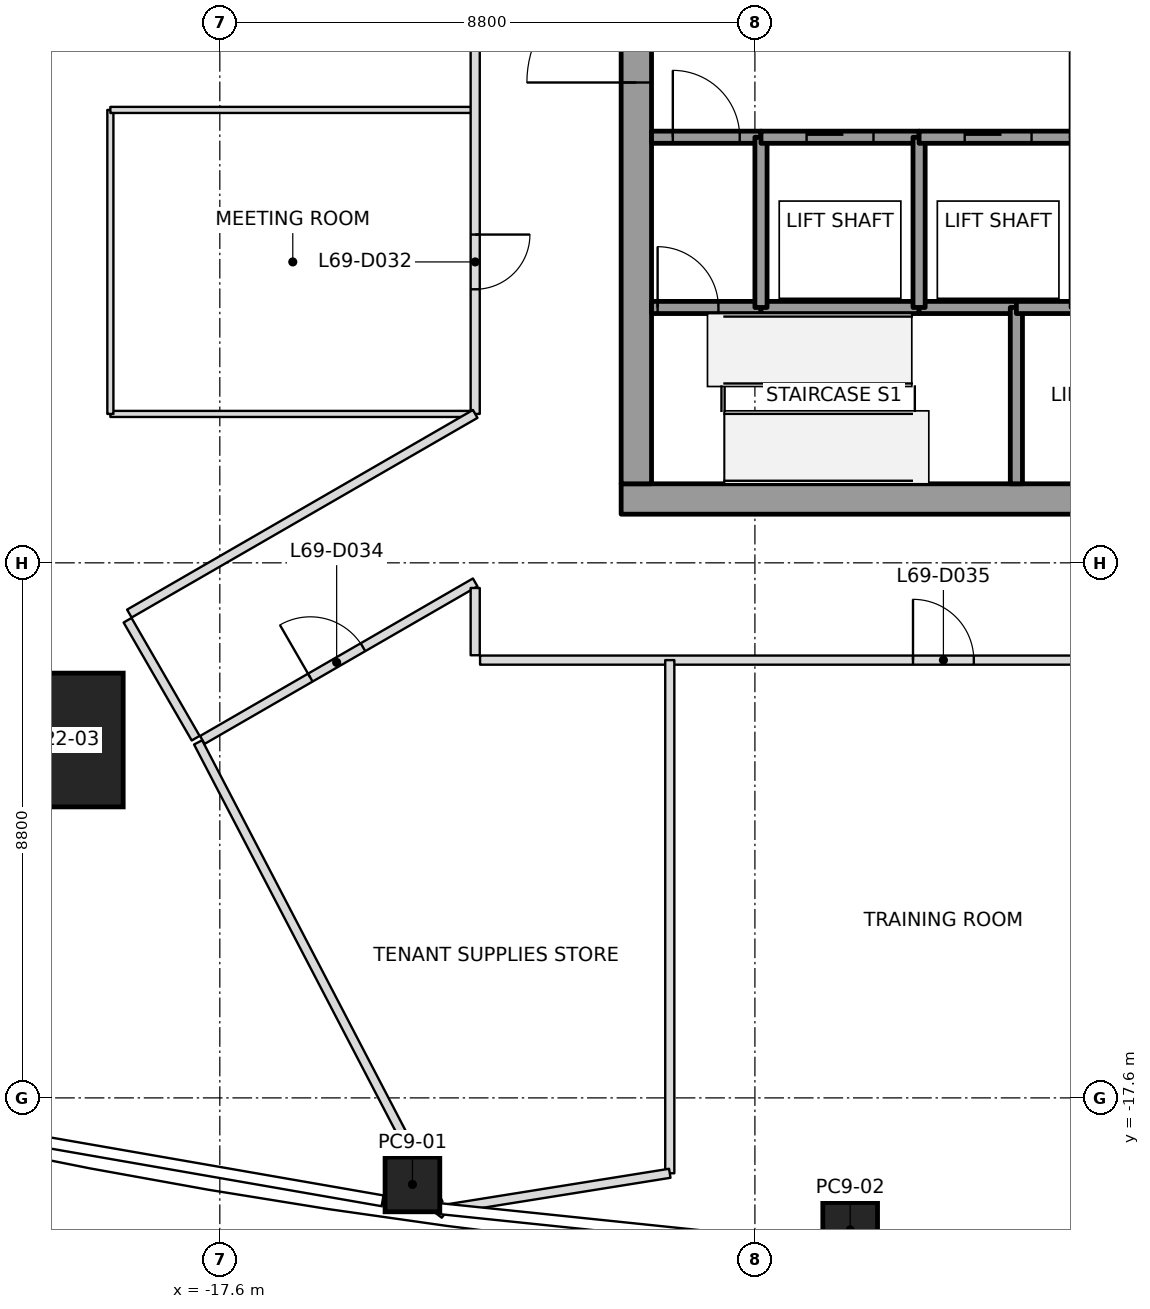
"""IFC4 building model, lengths in metres.
Left out: names, types, materials, properties, quantities, classifications, styles, units other than length and angle.
Written with IfcOpenShell. Run it as: python <this file> out.ifc"""

import sys

from ifc_helpers import new_model, si_unit, direction, frame, frame_2d, origin, origin_2d, place, context, subcontext, project, spatial, rectangle, extrude, element, fill, save


model = new_model("IFC4")
c1 = context("Model", 3, precision=1e-05, world=origin(), true_north=direction((0.0, 1.0)))
c2 = subcontext(c1, "Body", "Model", "MODEL_VIEW")
j1 = project(units=[si_unit("LENGTHUNIT", "METRE"), si_unit("PLANEANGLEUNIT", "RADIAN")], contexts=[c1])
p1 = place(None, origin())
s1 = spatial("IfcSite", under=j1, at=p1, CompositionType="ELEMENT")
p2 = place(p1, origin())
s2 = spatial("IfcBuilding", under=s1, at=p2, CompositionType="ELEMENT")
p3 = place(p2, frame((0.0, 0.0, 303.0)))
s3 = spatial("IfcBuildingStorey", under=s2, at=p3, CompositionType="ELEMENT", Elevation=303.0)
p4 = place(p3, frame((-20.289, -11.714, 0.0), z_axis=(0.027756720281, 0.01604399436, 0.999485945236), x_axis=(0.999614708015, -0.000445500311, -0.027753144871)))
e1 = element("IfcColumn", 1, at=p4, inside=s3, PredefinedType="COLUMN", context=c2, shape_type="SweptSolid", body=[
    extrude(rectangle(XDim=2.2, YDim=2.2, at=origin_2d()), origin(), (0.0, 0.0, 1.0), 4.002),
])
p5 = place(p3, frame((-14.432, -19.023, 0.0), z_axis=(0.017391452496, 0.010373848857, 0.999794939295), x_axis=(-0.990356057781, 0.137641808402, 0.01579909479)))
e2 = element("IfcColumn", 2, at=p5, inside=s3, PredefinedType="COLUMN", context=c2, shape_type="SweptSolid", body=[
    extrude(rectangle(XDim=0.9, YDim=0.9, at=origin_2d()), origin(), (0.0, 0.0, 1.0), 4.001),
])
p6 = place(p3, frame((-7.233, -19.771, 0.0), z_axis=(0.008727150594, 0.011168311599, 0.999899547784), x_axis=(-0.997585590685, 0.06899278007, 0.007936344038)))
e3 = element("IfcColumn", 3, at=p6, inside=s3, PredefinedType="COLUMN", context=c2, shape_type="SweptSolid", body=[
    extrude(rectangle(XDim=0.9, YDim=0.9, at=origin_2d()), origin(), (0.0, 0.0, 1.0), 4.0),
])
p7 = place(p3, frame((-11.0, -7.75, 0.0), z_axis=(0.0, 0.0, 1.0), x_axis=(1.0, 0.0, 0.0)))
e4 = element("IfcWall", 4, at=p7, inside=s3, PredefinedType="SHEAR", context=c2, shape_type="SweptSolid", body=[
    extrude(rectangle(XDim=22.0, YDim=0.5, at=frame_2d((11.0, 0.0))), origin(), (0.0, 0.0, 1.0), 4.0),
])
p8 = place(p7, frame((10.45, 0.0, 0.0)))
e5 = element("IfcOpeningElement", 5, at=p8, cuts=e4, PredefinedType="OPENING", context=c2, shape_type="SweptSolid", body=[
    extrude(rectangle(XDim=1.1, YDim=2.1, at=frame_2d((0.55, 1.05))), frame((0.0, 0.25, 0.0), z_axis=(0.0, -1.0, 0.0), x_axis=(1.0, 0.0, 0.0)), (0.0, 0.0, 1.0), 0.5),
])
p9 = place(p3, frame((-10.75, -7.5, 0.0), z_axis=(0.0, 0.0, 1.0), x_axis=(0.0, 1.0, 0.0)))
e6 = element("IfcWall", 6, at=p9, inside=s3, PredefinedType="SHEAR", context=c2, shape_type="SweptSolid", body=[
    extrude(rectangle(XDim=15.0, YDim=0.5, at=frame_2d((7.5, 0.0))), origin(), (0.0, 0.0, 1.0), 4.0),
])
p10 = place(p9, frame((6.6, 0.0, 0.0)))
e7 = element("IfcOpeningElement", 7, at=p10, cuts=e6, PredefinedType="OPENING", context=c2, shape_type="SweptSolid", body=[
    extrude(rectangle(XDim=1.8, YDim=2.1, at=frame_2d((0.9, 1.05))), frame((0.0, 0.25, 0.0), z_axis=(0.0, -1.0, 0.0), x_axis=(1.0, 0.0, 0.0)), (0.0, 0.0, 1.0), 0.5),
])
p11 = place(p3, frame((-10.5, -4.6, 0.0), z_axis=(0.0, 0.0, 1.0), x_axis=(1.0, 0.0, 0.0)))
e8 = element("IfcWall", 8, at=p11, inside=s3, PredefinedType="SOLIDWALL", context=c2, shape_type="SweptSolid", body=[
    extrude(rectangle(XDim=1.8, YDim=0.2, at=frame_2d((0.9, 0.0))), origin(), (0.0, 0.0, 1.0), 3.85),
])
p12 = place(p11, frame((0.1, 0.0, 0.0)))
e9 = element("IfcOpeningElement", 9, at=p12, cuts=e8, PredefinedType="OPENING", context=c2, shape_type="SweptSolid", body=[
    extrude(rectangle(XDim=1.0, YDim=2.1, at=frame_2d((0.5, 1.05))), frame((0.0, 0.1, 0.0), z_axis=(0.0, -1.0, 0.0), x_axis=(1.0, 0.0, 0.0)), (0.0, 0.0, 1.0), 0.2),
])
p13 = place(p3, frame((-10.5, -1.8, 0.0), z_axis=(0.0, 0.0, 1.0), x_axis=(1.0, 0.0, 0.0)))
e10 = element("IfcWall", 10, at=p13, inside=s3, PredefinedType="SOLIDWALL", context=c2, shape_type="SweptSolid", body=[
    extrude(rectangle(XDim=1.8, YDim=0.2, at=frame_2d((0.9, 0.0))), origin(), (0.0, 0.0, 1.0), 3.85),
])
p14 = place(p13, frame((0.35, 0.0, 0.0)))
e11 = element("IfcOpeningElement", 11, at=p14, cuts=e10, PredefinedType="OPENING", context=c2, shape_type="SweptSolid", body=[
    extrude(rectangle(XDim=1.1, YDim=2.1, at=frame_2d((0.55, 1.05))), frame((0.0, 0.1, 0.0), z_axis=(0.0, -1.0, 0.0), x_axis=(1.0, 0.0, 0.0)), (0.0, 0.0, 1.0), 0.2),
])
p15 = place(p3, frame((-8.7, -4.6, 0.0), z_axis=(0.0, 0.0, 1.0), x_axis=(1.0, 0.0, 0.0)))
e12 = element("IfcWall", 12, at=p15, inside=s3, PredefinedType="SOLIDWALL", context=c2, shape_type="SweptSolid", body=[
    extrude(rectangle(XDim=2.6, YDim=0.2, at=frame_2d((1.3, 0.0))), origin(), (0.0, 0.0, 1.0), 3.85),
])
p16 = place(p3, frame((-8.7, -4.6, 0.0), z_axis=(0.0, 0.0, 1.0), x_axis=(0.0, 1.0, 0.0)))
e13 = element("IfcWall", 13, at=p16, inside=s3, PredefinedType="SOLIDWALL", context=c2, shape_type="SweptSolid", body=[
    extrude(rectangle(XDim=2.8, YDim=0.2, at=frame_2d((1.4, 0.0))), origin(), (0.0, 0.0, 1.0), 3.85),
])
p17 = place(p3, frame((-8.7, -1.8, 0.0), z_axis=(0.0, 0.0, 1.0), x_axis=(1.0, 0.0, 0.0)))
e14 = element("IfcWall", 14, at=p17, inside=s3, PredefinedType="SOLIDWALL", context=c2, shape_type="SweptSolid", body=[
    extrude(rectangle(XDim=2.6, YDim=0.2, at=frame_2d((1.3, 0.0))), origin(), (0.0, 0.0, 1.0), 3.85),
])
p18 = place(p17, frame((0.75, 0.0, 0.0)))
e15 = element("IfcOpeningElement", 15, at=p18, cuts=e14, PredefinedType="OPENING", context=c2, shape_type="SweptSolid", body=[
    extrude(rectangle(XDim=1.1, YDim=2.1, at=frame_2d((0.55, 1.05))), frame((0.0, 0.1, 0.0), z_axis=(0.0, -1.0, 0.0), x_axis=(1.0, 0.0, 0.0)), (0.0, 0.0, 1.0), 0.2),
])
p19 = place(p3, frame((-6.1, -4.6, 0.0), z_axis=(0.0, 0.0, 1.0), x_axis=(1.0, 0.0, 0.0)))
e16 = element("IfcWall", 16, at=p19, inside=s3, PredefinedType="SOLIDWALL", context=c2, shape_type="SweptSolid", body=[
    extrude(rectangle(XDim=1.6, YDim=0.2, at=frame_2d((0.8, 0.0))), origin(), (0.0, 0.0, 1.0), 3.85),
])
p20 = place(p3, frame((-6.1, -4.6, 0.0), z_axis=(0.0, 0.0, 1.0), x_axis=(0.0, 1.0, 0.0)))
e17 = element("IfcWall", 17, at=p20, inside=s3, PredefinedType="SOLIDWALL", context=c2, shape_type="SweptSolid", body=[
    extrude(rectangle(XDim=2.8, YDim=0.2, at=frame_2d((1.4, 0.0))), origin(), (0.0, 0.0, 1.0), 3.85),
])
p21 = place(p3, frame((-6.1, -1.8, 0.0), z_axis=(0.0, 0.0, 1.0), x_axis=(1.0, 0.0, 0.0)))
e18 = element("IfcWall", 18, at=p21, inside=s3, PredefinedType="SOLIDWALL", context=c2, shape_type="SweptSolid", body=[
    extrude(rectangle(XDim=2.6, YDim=0.2, at=frame_2d((1.3, 0.0))), origin(), (0.0, 0.0, 1.0), 3.85),
])
p22 = place(p21, frame((0.75, 0.0, 0.0)))
e19 = element("IfcOpeningElement", 19, at=p22, cuts=e18, PredefinedType="OPENING", context=c2, shape_type="SweptSolid", body=[
    extrude(rectangle(XDim=1.1, YDim=2.1, at=frame_2d((0.55, 1.05))), frame((0.0, 0.1, 0.0), z_axis=(0.0, -1.0, 0.0), x_axis=(1.0, 0.0, 0.0)), (0.0, 0.0, 1.0), 0.2),
])
p23 = place(p3, frame((-4.5, -4.6, 0.0), z_axis=(0.0, 0.0, 1.0), x_axis=(0.0, -1.0, 0.0)))
e20 = element("IfcWall", 20, at=p23, inside=s3, PredefinedType="SOLIDWALL", context=c2, shape_type="SweptSolid", body=[
    extrude(rectangle(XDim=2.9, YDim=0.2, at=frame_2d((1.45, 0.0))), origin(), (0.0, 0.0, 1.0), 3.85),
])
p24 = place(p3, frame((-4.5, -4.6, 0.0), z_axis=(0.0, 0.0, 1.0), x_axis=(1.0, 0.0, 0.0)))
e21 = element("IfcWall", 21, at=p24, inside=s3, PredefinedType="SOLIDWALL", context=c2, shape_type="SweptSolid", body=[
    extrude(rectangle(XDim=1.0, YDim=0.2, at=frame_2d((0.5, 0.0))), origin(), (0.0, 0.0, 1.0), 3.85),
])
p25 = place(p3, frame((-17.957, -11.753, 0.0), z_axis=(0.0, 0.0, 1.0), x_axis=(0.462142572693, -0.886805639644, 0.0)))
e22 = element("IfcWall", 22, at=p25, inside=s3, PredefinedType="PARTITIONING", context=c2, shape_type="SweptSolid", body=[
    extrude(rectangle(XDim=8.553, YDim=0.15, at=frame_2d((4.276, 0.0))), origin(), (0.0, 0.0, 1.0), 3.3),
])
p26 = place(p3, frame((-10.2, -10.4, 0.0), z_axis=(0.0, 0.0, 1.0), x_axis=(0.0, -1.0, 0.0)))
e23 = element("IfcWall", 23, at=p26, inside=s3, PredefinedType="PARTITIONING", context=c2, shape_type="SweptSolid", body=[
    extrude(rectangle(XDim=8.44, YDim=0.15, at=frame_2d((4.22, 0.0))), origin(), (0.0, 0.0, 1.0), 3.3),
])
p27 = place(p3, frame((-10.2, -18.84, 0.0), z_axis=(0.0, 0.0, 1.0), x_axis=(-0.987451332471, -0.157923608119, 0.0)))
e24 = element("IfcWall", 24, at=p27, inside=s3, PredefinedType="PARTITIONING", context=c2, shape_type="SweptSolid", body=[
    extrude(rectangle(XDim=3.701, YDim=0.15, at=frame_2d((1.851, 0.0))), origin(), (0.0, 0.0, 1.0), 3.234),
])
p28 = place(p3, frame((-13.905, -19.511, 0.0), z_axis=(0.0, 0.0, 1.0), x_axis=(-0.796009034685, 0.605284740185, 0.0)))
e25 = element("IfcWall", 25, at=p28, inside=s3, PredefinedType="PARTITIONING", context=c2, shape_type="SweptSolid", body=[
    extrude(rectangle(XDim=0.184, YDim=0.15, at=frame_2d((0.092, 0.0))), origin(), (0.0, 0.0, 1.0), 3.3),
])
p29 = place(p3, frame((-19.117, -9.744, 0.0), z_axis=(0.0, 0.0, 1.0), x_axis=(0.500030632641, -0.866007717299, 0.0)))
e26 = element("IfcWall", 26, at=p29, inside=s3, PredefinedType="PARTITIONING", context=c2, shape_type="SweptSolid", body=[
    extrude(rectangle(XDim=2.24, YDim=0.15, at=frame_2d((1.12, 0.0))), origin(), (0.0, 0.0, 1.0), 3.233),
])
p30 = place(p3, frame((-13.4, 6.351, 0.0), z_axis=(0.0, 0.0, 1.0), x_axis=(0.0, -1.0, 0.0)))
e27 = element("IfcWall", 27, at=p30, inside=s3, PredefinedType="PARTITIONING", context=c2, shape_type="SweptSolid", body=[
    extrude(rectangle(XDim=12.702, YDim=0.15, at=frame_2d((6.351, 0.0))), origin(), (0.0, 0.0, 1.0), 3.3),
])
p31 = place(p30, frame((9.752, 0.0, 0.0)))
e28 = element("IfcOpeningElement", 28, at=p31, cuts=e27, PredefinedType="OPENING", context=c2, shape_type="SweptSolid", body=[
    extrude(rectangle(XDim=0.9, YDim=2.1, at=frame_2d((0.45, 1.05))), frame((0.0, 0.075, 0.0), z_axis=(0.0, -1.0, 0.0), x_axis=(1.0, 0.0, 0.0)), (0.0, 0.0, 1.0), 0.15),
])
p32 = place(p30, frame((3.301, 0.0, 0.0)))
e29 = element("IfcOpeningElement", 29, at=p32, cuts=e27, PredefinedType="OPENING", context=c2, shape_type="SweptSolid", body=[
    extrude(rectangle(XDim=1.0, YDim=2.1, at=frame_2d((0.5, 1.05))), frame((0.0, 0.075, 0.0), z_axis=(0.0, -1.0, 0.0), x_axis=(1.0, 0.0, 0.0)), (0.0, 0.0, 1.0), 0.15),
])
p33 = place(p3, frame((-13.4, -6.351, 0.0), z_axis=(0.0, 0.0, 1.0), x_axis=(-0.866027119138, -0.499997028909, 0.0)))
e30 = element("IfcWall", 30, at=p33, inside=s3, PredefinedType="PARTITIONING", context=c2, shape_type="SweptSolid", body=[
    extrude(rectangle(XDim=6.568, YDim=0.15, at=frame_2d((3.284, 0.0))), origin(), (0.0, 0.0, 1.0), 3.3),
])
p34 = place(p3, frame((-17.888, -11.713, 0.0), z_axis=(0.0, 0.0, 1.0), x_axis=(0.866022397746, 0.500005206576, 0.0)))
e31 = element("IfcWall", 31, at=p34, inside=s3, PredefinedType="PARTITIONING", context=c2, shape_type="SweptSolid", body=[
    extrude(rectangle(XDim=5.182, YDim=0.15, at=frame_2d((2.591, 0.0))), origin(), (0.0, 0.0, 1.0), 3.233),
])
p35 = place(p34, frame((2.051, 0.0, 0.0)))
e32 = element("IfcOpeningElement", 32, at=p35, cuts=e31, PredefinedType="OPENING", context=c2, shape_type="SweptSolid", body=[
    extrude(rectangle(XDim=1.0, YDim=2.1, at=frame_2d((0.5, 1.05))), frame((0.0, 0.075, 0.0), z_axis=(0.0, -1.0, 0.0), x_axis=(1.0, 0.0, 0.0)), (0.0, 0.0, 1.0), 0.15),
])
p36 = place(p3, frame((-13.4, -9.214, 0.0), z_axis=(0.0, 0.0, 1.0), x_axis=(0.0, -1.0, 0.0)))
e33 = element("IfcWall", 33, at=p36, inside=s3, PredefinedType="PARTITIONING", context=c2, shape_type="SweptSolid", body=[
    extrude(rectangle(XDim=1.106, YDim=0.15, at=frame_2d((0.553, 0.0))), origin(), (0.0, 0.0, 1.0), 3.233),
])
p37 = place(p3, frame((-13.32, -10.4, 0.0), z_axis=(0.0, 0.0, 1.0), x_axis=(1.0, 0.0, 0.0)))
e34 = element("IfcWall", 34, at=p37, inside=s3, PredefinedType="PARTITIONING", context=c2, shape_type="SweptSolid", body=[
    extrude(rectangle(XDim=12.12, YDim=0.15, at=frame_2d((6.06, 0.0))), origin(), (0.0, 0.0, 1.0), 3.3),
])
p38 = place(p37, frame((7.12, 0.0, 0.0)))
e35 = element("IfcOpeningElement", 35, at=p38, cuts=e34, PredefinedType="OPENING", context=c2, shape_type="SweptSolid", body=[
    extrude(rectangle(XDim=1.0, YDim=2.1, at=frame_2d((0.5, 1.05))), frame((0.0, 0.075, 0.0), z_axis=(0.0, -1.0, 0.0), x_axis=(1.0, 0.0, 0.0)), (0.0, 0.0, 1.0), 0.15),
])
p39 = place(p3, frame((-13.46, -6.351, 0.0), z_axis=(0.0, 0.0, 1.0), x_axis=(-1.0, 0.0, 0.0)))
e36 = element("IfcWall", 36, at=p39, inside=s3, PredefinedType="PARTITIONING", context=c2, shape_type="SweptSolid", body=[
    extrude(rectangle(XDim=5.94, YDim=0.1, at=frame_2d((2.97, 0.0))), origin(), (0.0, 0.0, 1.0), 3.3),
])
p40 = place(p3, frame((-19.4, -6.351, 0.0), z_axis=(0.0, 0.0, 1.0), x_axis=(0.0, 1.0, 0.0)))
e37 = element("IfcWall", 37, at=p40, inside=s3, PredefinedType="PARTITIONING", context=c2, shape_type="SweptSolid", body=[
    extrude(rectangle(XDim=5.0, YDim=0.1, at=frame_2d((2.5, 0.0))), origin(), (0.0, 0.0, 1.0), 3.3),
])
p41 = place(p3, frame((-19.4, -1.351, 0.0), z_axis=(0.0, 0.0, 1.0), x_axis=(1.0, 0.0, 0.0)))
e38 = element("IfcWall", 38, at=p41, inside=s3, PredefinedType="PARTITIONING", context=c2, shape_type="SweptSolid", body=[
    extrude(rectangle(XDim=5.97, YDim=0.1, at=frame_2d((2.985, 0.0))), origin(), (0.0, 0.0, 1.0), 3.3),
])
p42 = place(p31, origin())
e39 = element("IfcDoor", 39, at=p42, inside=s3, OperationType="SINGLE_SWING_LEFT", PredefinedType="DOOR", context=c2, shape_type="SweptSolid", body=[
    extrude(rectangle(XDim=0.9, YDim=2.1, at=frame_2d((0.45, 1.05))), frame((0.0, 0.025, 0.0), z_axis=(0.0, -1.0, 0.0), x_axis=(1.0, 0.0, 0.0)), (0.0, 0.0, 1.0), 0.05),
])
fill(e28, e39)
p43 = place(p35, origin())
e40 = element("IfcDoor", 40, at=p43, inside=s3, OperationType="SINGLE_SWING_RIGHT", PredefinedType="DOOR", context=c2, shape_type="SweptSolid", body=[
    extrude(rectangle(XDim=1.0, YDim=2.1, at=frame_2d((0.5, 1.05))), frame((0.0, 0.025, 0.0), z_axis=(0.0, -1.0, 0.0), x_axis=(1.0, 0.0, 0.0)), (0.0, 0.0, 1.0), 0.05),
])
fill(e32, e40)
p44 = place(p38, origin())
e41 = element("IfcDoor", 41, at=p44, inside=s3, OperationType="SINGLE_SWING_LEFT", PredefinedType="DOOR", context=c2, shape_type="SweptSolid", body=[
    extrude(rectangle(XDim=1.0, YDim=2.1, at=frame_2d((0.5, 1.05))), frame((0.0, 0.025, 0.0), z_axis=(0.0, -1.0, 0.0), x_axis=(1.0, 0.0, 0.0)), (0.0, 0.0, 1.0), 0.05),
])
fill(e35, e41)
p45 = place(p18, origin())
e42 = element("IfcDoor", 42, at=p45, inside=s3, OperationType="SLIDING_TO_LEFT", PredefinedType="DOOR", context=c2, shape_type="SweptSolid", body=[
    extrude(rectangle(XDim=1.1, YDim=2.1, at=frame_2d((0.55, 1.05))), frame((0.0, 0.025, 0.0), z_axis=(0.0, -1.0, 0.0), x_axis=(1.0, 0.0, 0.0)), (0.0, 0.0, 1.0), 0.05),
])
fill(e15, e42)
p46 = place(p22, origin())
e43 = element("IfcDoor", 43, at=p46, inside=s3, OperationType="SLIDING_TO_RIGHT", PredefinedType="DOOR", context=c2, shape_type="SweptSolid", body=[
    extrude(rectangle(XDim=1.1, YDim=2.1, at=frame_2d((0.55, 1.05))), frame((0.0, 0.025, 0.0), z_axis=(0.0, -1.0, 0.0), x_axis=(1.0, 0.0, 0.0)), (0.0, 0.0, 1.0), 0.05),
])
fill(e19, e43)
p47 = place(p14, origin())
e44 = element("IfcDoor", 44, at=p47, inside=s3, OperationType="SINGLE_SWING_LEFT", PredefinedType="DOOR", context=c2, shape_type="SweptSolid", body=[
    extrude(rectangle(XDim=1.1, YDim=2.1, at=frame_2d((0.55, 1.05))), frame((0.0, 0.025, 0.0), z_axis=(0.0, -1.0, 0.0), x_axis=(1.0, 0.0, 0.0)), (0.0, 0.0, 1.0), 0.05),
])
fill(e11, e44)
p48 = place(p12, origin())
e45 = element("IfcDoor", 45, at=p48, inside=s3, OperationType="SINGLE_SWING_LEFT", PredefinedType="DOOR", context=c2, shape_type="SweptSolid", body=[
    extrude(rectangle(XDim=1.0, YDim=2.1, at=frame_2d((0.5, 1.05))), frame((0.0, 0.025, 0.0), z_axis=(0.0, -1.0, 0.0), x_axis=(1.0, 0.0, 0.0)), (0.0, 0.0, 1.0), 0.05),
])
fill(e9, e45)
p49 = place(p10, origin())
e46 = element("IfcDoor", 46, at=p49, inside=s3, OperationType="DOUBLE_DOOR_SINGLE_SWING", PredefinedType="DOOR", context=c2, shape_type="SweptSolid", body=[
    extrude(rectangle(XDim=1.8, YDim=2.1, at=frame_2d((0.9, 1.05))), frame((0.0, 0.025, 0.0), z_axis=(0.0, -1.0, 0.0), x_axis=(1.0, 0.0, 0.0)), (0.0, 0.0, 1.0), 0.05),
])
fill(e7, e46)
save(model, sys.argv[1])
